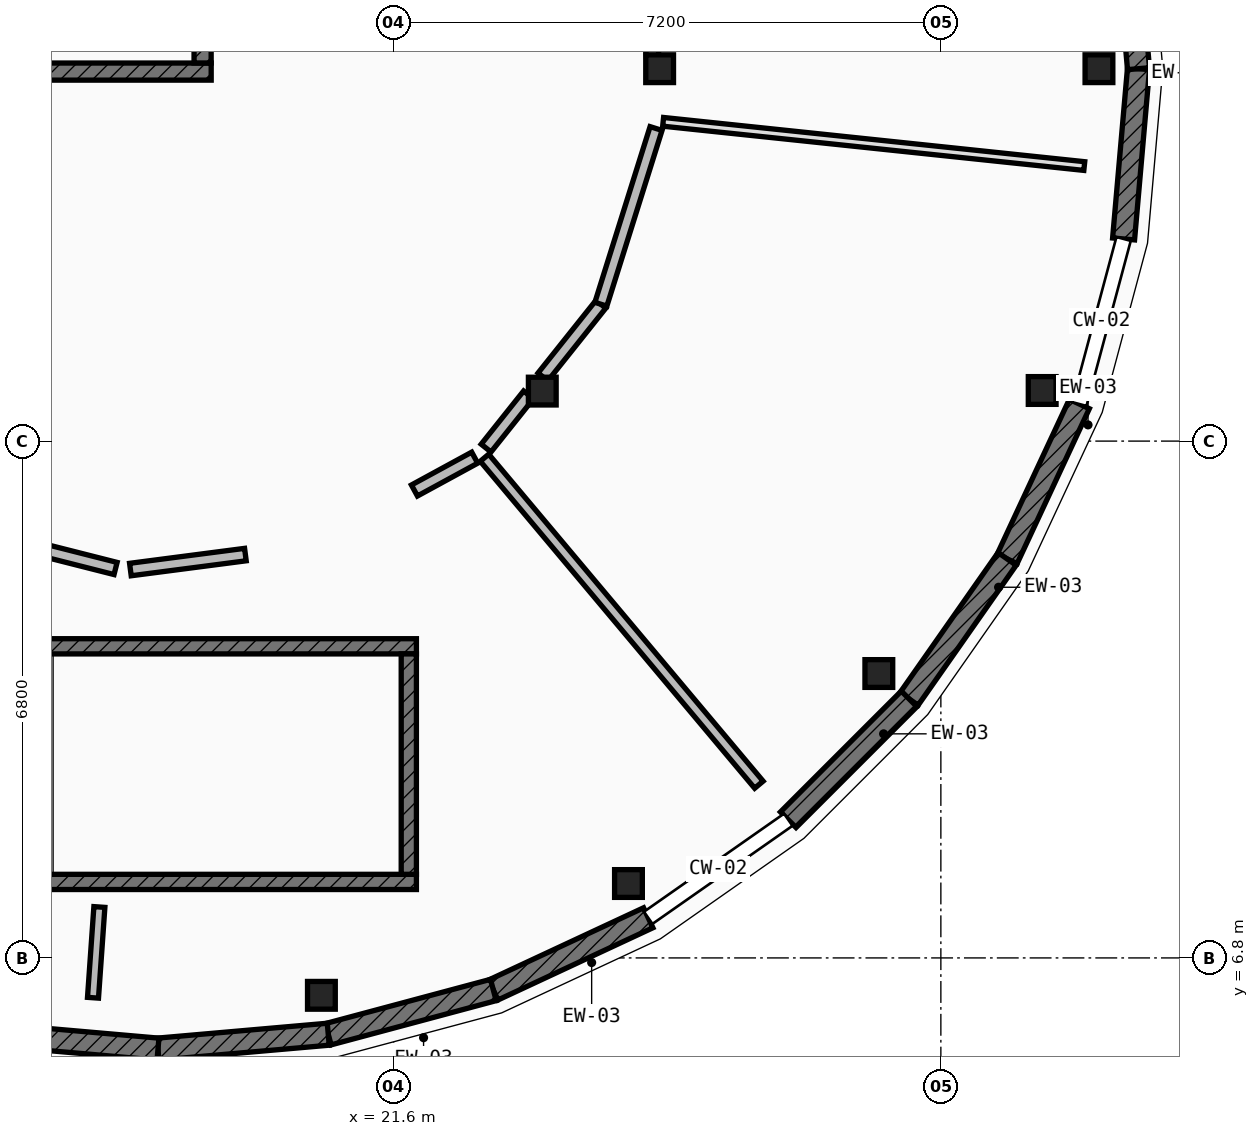
"""IFC4 building model, lengths in metres.
Left out: names, types, materials, properties, quantities, classifications, styles, units other than length and angle.
Written with IfcOpenShell. Run it as: python <this file> out.ifc"""

import sys

from ifc_helpers import new_model, si_unit, direction, frame, frame_2d, origin, origin_2d, place, context, subcontext, project, spatial, rectangle, extrude, element, fill, save


model = new_model("IFC4")
c1 = context("Model", 3, precision=1e-05, world=origin(), true_north=direction((0.0, 1.0)))
c2 = subcontext(c1, "Body", "Model", "MODEL_VIEW")
j1 = project(units=[si_unit("LENGTHUNIT", "METRE"), si_unit("PLANEANGLEUNIT", "RADIAN")], contexts=[c1])
p1 = place(None, origin())
s1 = spatial("IfcSite", under=j1, at=p1, CompositionType="ELEMENT")
p2 = place(p1, origin())
s2 = spatial("IfcBuilding", under=s1, at=p2, CompositionType="ELEMENT")
p3 = place(p2, frame((0.0, 0.0, 8.75)))
s3 = spatial("IfcBuildingStorey", under=s2, at=p3, CompositionType="ELEMENT", Elevation=8.75)
for number, where, z_axis, x_axis in (
    (1, (30.88, 18.5, 0.0), (0.0, 0.0, 1.0), (1.0, 0.0, 0.0)),
    (2, (20.65, 6.308, 0.0), (0.0, 0.0, 1.0), (1.0, 0.0, 0.0)),
    (3, (24.69, 7.779, 0.0), (0.0, 0.0, 1.0), (1.0, 0.0, 0.0)),
    (4, (27.984, 10.542, 0.0), (0.0, 0.0, 1.0), (1.0, 0.0, 0.0)),
    (5, (30.133, 14.266, 0.0), (0.0, 0.0, 1.0), (1.0, 0.0, 0.0)),
    (6, (25.1, 18.5, 0.0), (0.0, 0.0, 1.0), (1.0, 0.0, 0.0)),
    (7, (23.556, 14.258, 0.0), (0.0, 0.0, 1.0), (1.0, 0.0, 0.0)),
):
    element("IfcColumn", number, at=place(p3, frame(where, z_axis=z_axis, x_axis=x_axis)), inside=s3, PredefinedType="COLUMN", context=c2, shape_type="SweptSolid", body=[
        extrude(rectangle(XDim=0.365, YDim=0.365, at=origin_2d()), origin(), (0.0, 0.0, 1.0), 4.2),
    ])
p4 = place(p3, frame((31.4, 18.5, 0.0), z_axis=(0.0, 0.0, 1.0), x_axis=(-0.087079400775, -0.996201374201, 0.0)))
e8 = element("IfcWall", 8, at=p4, inside=s3, PredefinedType="ELEMENTEDWALL", context=c2, shape_type="SweptSolid", body=[
    extrude(rectangle(XDim=2.249, YDim=0.29, at=frame_2d((1.124, 0.0))), origin(), (0.0, 0.0, 1.0), 3.329),
])
p5 = place(p4, frame((0.474, 0.0, 0.7)))
e9 = element("IfcOpeningElement", 9, at=p5, cuts=e8, PredefinedType="OPENING", context=c2, shape_type="SweptSolid", body=[
    extrude(rectangle(XDim=1.3, YDim=2.3, at=frame_2d((0.65, 1.15))), frame((0.0, 0.155, 0.0), z_axis=(0.0, -1.0, 0.0), x_axis=(1.0, 0.0, 0.0)), (0.0, 0.0, 1.0), 0.31),
])
p6 = place(p3, frame((30.622, 14.088, 0.0), z_axis=(0.0, 0.0, 1.0), x_axis=(-0.422504983593, -0.906360600886, 0.0)))
e10 = element("IfcWall", 10, at=p6, inside=s3, PredefinedType="ELEMENTEDWALL", context=c2, shape_type="SweptSolid", body=[
    extrude(rectangle(XDim=2.248, YDim=0.29, at=frame_2d((1.124, 0.0))), origin(), (0.0, 0.0, 1.0), 3.329),
])
p7 = place(p6, frame((0.464, 0.0, 0.85)))
e11 = element("IfcOpeningElement", 11, at=p7, cuts=e10, PredefinedType="OPENING", context=c2, shape_type="SweptSolid", body=[
    extrude(rectangle(XDim=1.32, YDim=1.55, at=frame_2d((0.66, 0.775))), frame((0.0, 0.155, 0.0), z_axis=(0.0, -1.0, 0.0), x_axis=(1.0, 0.0, 0.0)), (0.0, 0.0, 1.0), 0.31),
])
p8 = place(p3, frame((29.672, 12.05, 0.0), z_axis=(0.0, 0.0, 1.0), x_axis=(-0.573644482107, -0.819104393925, 0.0)))
e12 = element("IfcWall", 12, at=p8, inside=s3, PredefinedType="ELEMENTEDWALL", context=c2, shape_type="SweptSolid", body=[
    extrude(rectangle(XDim=2.249, YDim=0.29, at=frame_2d((1.125, 0.0))), origin(), (0.0, 0.0, 1.0), 3.329),
])
p9 = place(p8, frame((0.449, 0.0, 0.85)))
e13 = element("IfcOpeningElement", 13, at=p9, cuts=e12, PredefinedType="OPENING", context=c2, shape_type="SweptSolid", body=[
    extrude(rectangle(XDim=1.35, YDim=1.55, at=frame_2d((0.675, 0.775))), frame((0.0, 0.155, 0.0), z_axis=(0.0, -1.0, 0.0), x_axis=(1.0, 0.0, 0.0)), (0.0, 0.0, 1.0), 0.31),
])
p10 = place(p3, frame((28.382, 10.208, 0.0), z_axis=(0.0, 0.0, 1.0), x_axis=(-0.707106781187, -0.707106781187, 0.0)))
e14 = element("IfcWall", 14, at=p10, inside=s3, PredefinedType="ELEMENTEDWALL", context=c2, shape_type="SweptSolid", body=[
    extrude(rectangle(XDim=2.249, YDim=0.29, at=frame_2d((1.125, 0.0))), origin(), (0.0, 0.0, 1.0), 3.329),
])
p11 = place(p10, frame((0.449, 0.0, 0.85)))
e15 = element("IfcOpeningElement", 15, at=p11, cuts=e14, PredefinedType="OPENING", context=c2, shape_type="SweptSolid", body=[
    extrude(rectangle(XDim=1.35, YDim=1.85, at=frame_2d((0.675, 0.925))), frame((0.0, 0.155, 0.0), z_axis=(0.0, -1.0, 0.0), x_axis=(1.0, 0.0, 0.0)), (0.0, 0.0, 1.0), 0.31),
])
p12 = place(p3, frame((24.95, 7.328, 0.0), z_axis=(0.0, 0.0, 1.0), x_axis=(-0.906360600886, -0.422504983593, 0.0)))
e16 = element("IfcWall", 16, at=p12, inside=s3, PredefinedType="ELEMENTEDWALL", context=c2, shape_type="SweptSolid", body=[
    extrude(rectangle(XDim=2.248, YDim=0.29, at=frame_2d((1.124, 0.0))), origin(), (0.0, 0.0, 1.0), 3.329),
])
p13 = place(p12, frame((0.449, 0.0, 0.85)))
e17 = element("IfcOpeningElement", 17, at=p13, cuts=e16, PredefinedType="OPENING", context=c2, shape_type="SweptSolid", body=[
    extrude(rectangle(XDim=1.35, YDim=2.15, at=frame_2d((0.675, 1.075))), frame((0.0, 0.155, 0.0), z_axis=(0.0, -1.0, 0.0), x_axis=(1.0, 0.0, 0.0)), (0.0, 0.0, 1.0), 0.31),
])
p14 = place(p3, frame((22.912, 6.378, 0.0), z_axis=(0.0, 0.0, 1.0), x_axis=(-0.96592430538, -0.258824721145, 0.0)))
e18 = element("IfcWall", 18, at=p14, inside=s3, PredefinedType="ELEMENTEDWALL", context=c2, shape_type="SweptSolid", body=[
    extrude(rectangle(XDim=2.249, YDim=0.29, at=frame_2d((1.125, 0.0))), origin(), (0.0, 0.0, 1.0), 3.329),
])
p15 = place(p14, frame((0.434, 0.0, 0.85)))
e19 = element("IfcOpeningElement", 19, at=p15, cuts=e18, PredefinedType="OPENING", context=c2, shape_type="SweptSolid", body=[
    extrude(rectangle(XDim=1.38, YDim=1.7, at=frame_2d((0.69, 0.85))), frame((0.0, 0.155, 0.0), z_axis=(0.0, -1.0, 0.0), x_axis=(1.0, 0.0, 0.0)), (0.0, 0.0, 1.0), 0.31),
])
for number, where, z_axis, x_axis in (
    (20, (20.74, 5.796, 0.0), (0.0, 0.0, 1.0), (-0.996, -0.087, 0.0)),
    (21, (18.5, 5.6, 0.0), (0.0, 0.0, 1.0), (-0.996, 0.087, 0.0)),
):
    element("IfcWall", number, at=place(p3, frame(where, z_axis=z_axis, x_axis=x_axis)), inside=s3, PredefinedType="ELEMENTEDWALL", context=c2, shape_type="SweptSolid", body=[
        extrude(rectangle(XDim=2.249, YDim=0.29, at=frame_2d((1.124, 0.0))), origin(), (0.0, 0.0, 1.0), 3.329),
    ])
p16 = place(p3, frame((31.204, 20.74, 0.0), z_axis=(0.0, 0.0, 1.0), x_axis=(0.087079400775, -0.996201374201, 0.0)))
e22 = element("IfcWall", 22, at=p16, inside=s3, PredefinedType="ELEMENTEDWALL", context=c2, shape_type="SweptSolid", body=[
    extrude(rectangle(XDim=2.249, YDim=0.29, at=frame_2d((1.124, 0.0))), origin(), (0.0, 0.0, 1.0), 3.329),
])
p17 = place(p16, frame((0.674, 0.0, 0.85)))
e23 = element("IfcOpeningElement", 23, at=p17, cuts=e22, PredefinedType="OPENING", context=c2, shape_type="SweptSolid", body=[
    extrude(rectangle(XDim=0.9, YDim=1.4, at=frame_2d((0.45, 0.7))), frame((0.0, 0.155, 0.0), z_axis=(0.0, -1.0, 0.0), x_axis=(1.0, 0.0, 0.0)), (0.0, 0.0, 1.0), 0.31),
])
p18 = place(p3, frame((21.9, 10.9, 0.0), z_axis=(0.0, 0.0, 1.0), x_axis=(-1.0, 0.0, 0.0)))
e24 = element("IfcWall", 24, at=p18, inside=s3, PredefinedType="SHEAR", context=c2, shape_type="SweptSolid", body=[
    extrude(rectangle(XDim=6.8, YDim=0.2, at=frame_2d((3.4, 0.0))), origin(), (0.0, 0.0, 1.0), 3.975),
])
p19 = place(p18, frame((0.38, 0.0, 0.0)))
e25 = element("IfcOpeningElement", 25, at=p19, cuts=e24, PredefinedType="OPENING", context=c2, shape_type="SweptSolid", body=[
    extrude(rectangle(XDim=1.05, YDim=2.15, at=frame_2d((0.525, 1.075))), frame((0.0, 0.11, 0.0), z_axis=(0.0, -1.0, 0.0), x_axis=(1.0, 0.0, 0.0)), (0.0, 0.0, 1.0), 0.22),
])
p20 = place(p3, frame((21.9, 7.8, 0.0), z_axis=(0.0, 0.0, 1.0), x_axis=(-1.0, 0.0, 0.0)))
e26 = element("IfcWall", 26, at=p20, inside=s3, PredefinedType="SHEAR", context=c2, shape_type="SweptSolid", body=[
    extrude(rectangle(XDim=6.8, YDim=0.2, at=frame_2d((3.4, 0.0))), origin(), (0.0, 0.0, 1.0), 3.975),
])
p21 = place(p3, frame((21.8, 10.8, 0.0), z_axis=(0.0, 0.0, 1.0), x_axis=(0.0, -1.0, 0.0)))
e27 = element("IfcWall", 27, at=p21, inside=s3, PredefinedType="SHEAR", context=c2, shape_type="SweptSolid", body=[
    extrude(rectangle(XDim=2.9, YDim=0.2, at=frame_2d((1.45, 0.0))), origin(), (0.0, 0.0, 1.0), 3.975),
])
p22 = place(p3, frame((16.1, 18.462, 0.0), z_axis=(0.0, 0.0, 1.0), x_axis=(1.0, 0.0, 0.0)))
e28 = element("IfcWall", 28, at=p22, inside=s3, PredefinedType="SHEAR", context=c2, shape_type="SweptSolid", body=[
    extrude(rectangle(XDim=3.1, YDim=0.225, at=frame_2d((1.55, 0.0))), origin(), (0.0, 0.0, 1.0), 3.975),
])
p23 = place(p22, frame((0.9, 0.0, 0.0)))
e29 = element("IfcOpeningElement", 29, at=p23, cuts=e28, PredefinedType="OPENING", context=c2, shape_type="SweptSolid", body=[
    extrude(rectangle(XDim=1.3, YDim=2.2, at=frame_2d((0.65, 1.1))), frame((0.0, 0.123, 0.0), z_axis=(0.0, -1.0, 0.0), x_axis=(1.0, 0.0, 0.0)), (0.0, 0.0, 1.0), 0.245),
])
p24 = place(p3, frame((19.087, 18.575, 0.0), z_axis=(0.0, 0.0, 1.0), x_axis=(0.0, 1.0, 0.0)))
e30 = element("IfcWall", 30, at=p24, inside=s3, PredefinedType="SHEAR", context=c2, shape_type="SweptSolid", body=[
    extrude(rectangle(XDim=2.15, YDim=0.225, at=frame_2d((1.075, 0.0))), origin(), (0.0, 0.0, 1.0), 3.975),
])
p25 = place(p3, frame((17.729, 7.47, 0.0), z_axis=(0.0, 0.0, 1.0), x_axis=(-0.070159946762, -0.997535754683, 0.0)))
e31 = element("IfcWall", 31, at=p25, inside=s3, PredefinedType="PARTITIONING", context=c2, shape_type="SweptSolid", body=[
    extrude(rectangle(XDim=1.197, YDim=0.145, at=frame_2d((0.599, 0.0))), origin(), (0.0, 0.0, 1.0), 3.304),
])
p26 = place(p3, frame((22.796, 13.381, 0.0), z_axis=(0.0, 0.0, 1.0), x_axis=(0.642818869514, -0.766018211923, 0.0)))
e32 = element("IfcWall", 32, at=p26, inside=s3, PredefinedType="PARTITIONING", context=c2, shape_type="SweptSolid", body=[
    extrude(rectangle(XDim=5.616, YDim=0.145, at=frame_2d((2.808, 0.0))), origin(), (0.0, 0.0, 1.0), 3.304),
])
p27 = place(p3, frame((25.146, 17.801, 0.0), z_axis=(0.0, 0.0, 1.0), x_axis=(0.994528479097, -0.10446580429, 0.0)))
e33 = element("IfcWall", 33, at=p27, inside=s3, PredefinedType="PARTITIONING", context=c2, shape_type="SweptSolid", body=[
    extrude(rectangle(XDim=5.572, YDim=0.115, at=frame_2d((2.786, 0.0))), origin(), (0.0, 0.0, 1.0), 3.304),
])
p28 = place(p3, frame((15.856, 12.453, 0.0), z_axis=(0.0, 0.0, 1.0), x_axis=(0.969336371772, -0.245737661664, 0.0)))
e34 = element("IfcWall", 34, at=p28, inside=s3, PredefinedType="PARTITIONING", context=c2, shape_type="SweptSolid", body=[
    extrude(rectangle(XDim=2.152, YDim=0.165, at=frame_2d((1.076, 0.0))), origin(), (0.0, 0.0, 1.0), 3.304),
])
p29 = place(p3, frame((18.137, 11.91, 0.0), z_axis=(0.0, 0.0, 1.0), x_axis=(0.991627158641, 0.129133954659, 0.0)))
e35 = element("IfcWall", 35, at=p29, inside=s3, PredefinedType="PARTITIONING", context=c2, shape_type="SweptSolid", body=[
    extrude(rectangle(XDim=1.526, YDim=0.165, at=frame_2d((0.763, 0.0))), origin(), (0.0, 0.0, 1.0), 3.304),
])
p30 = place(p3, frame((21.874, 12.95, 0.0), z_axis=(0.0, 0.0, 1.0), x_axis=(0.878081476712, 0.478511149563, 0.0)))
e36 = element("IfcWall", 36, at=p30, inside=s3, PredefinedType="PARTITIONING", context=c2, shape_type="SweptSolid", body=[
    extrude(rectangle(XDim=0.903, YDim=0.165, at=frame_2d((0.452, 0.0))), origin(), (0.0, 0.0, 1.0), 3.304),
])
p31 = place(p3, frame((22.817, 13.508, 0.0), z_axis=(0.0, 0.0, 1.0), x_axis=(0.623430420195, 0.781878834076, 0.0)))
e37 = element("IfcWall", 37, at=p31, inside=s3, PredefinedType="PARTITIONING", context=c2, shape_type="SweptSolid", body=[
    extrude(rectangle(XDim=0.895, YDim=0.165, at=frame_2d((0.448, 0.0))), origin(), (0.0, 0.0, 1.0), 3.304),
])
p32 = place(p3, frame((23.565, 14.445, 0.0), z_axis=(0.0, 0.0, 1.0), x_axis=(0.623354481925, 0.781939377359, 0.0)))
e38 = element("IfcWall", 38, at=p32, inside=s3, PredefinedType="PARTITIONING", context=c2, shape_type="SweptSolid", body=[
    extrude(rectangle(XDim=1.222, YDim=0.165, at=frame_2d((0.611, 0.0))), origin(), (0.0, 0.0, 1.0), 3.304),
])
p33 = place(p3, frame((24.327, 15.401, 0.0), z_axis=(0.0, 0.0, 1.0), x_axis=(0.299617014986, 0.954059560159, 0.0)))
e39 = element("IfcWall", 39, at=p33, inside=s3, PredefinedType="PARTITIONING", context=c2, shape_type="SweptSolid", body=[
    extrude(rectangle(XDim=2.423, YDim=0.165, at=frame_2d((1.212, 0.0))), origin(), (0.0, 0.0, 1.0), 3.304),
])
p34 = place(p33, frame((0.621, 0.0, 0.0)))
e40 = element("IfcOpeningElement", 40, at=p34, cuts=e39, PredefinedType="OPENING", context=c2, shape_type="SweptSolid", body=[
    extrude(rectangle(XDim=1.18, YDim=2.2, at=frame_2d((0.59, 1.1))), frame((0.0, 0.093, 0.0), z_axis=(0.0, -1.0, 0.0), x_axis=(1.0, 0.0, 0.0)), (0.0, 0.0, 1.0), 0.185),
])
p35 = place(p3, frame((25.008, 18.663, 0.0), z_axis=(0.0, 0.0, 1.0), x_axis=(-0.085807505565, 0.996311734343, 0.0)))
e41 = element("IfcWall", 41, at=p35, inside=s3, PredefinedType="PARTITIONING", context=c2, shape_type="SweptSolid", body=[
    extrude(rectangle(XDim=1.551, YDim=0.165, at=frame_2d((0.775, 0.0))), origin(), (0.0, 0.0, 1.0), 3.304),
])
p36 = place(p35, frame((0.3, 0.0, 0.0)))
e42 = element("IfcOpeningElement", 42, at=p36, cuts=e41, PredefinedType="OPENING", context=c2, shape_type="SweptSolid", body=[
    extrude(rectangle(XDim=0.95, YDim=2.16, at=frame_2d((0.475, 1.08))), frame((0.0, 0.093, 0.0), z_axis=(0.0, -1.0, 0.0), x_axis=(1.0, 0.0, 0.0)), (0.0, 0.0, 1.0), 0.185),
])
p37 = place(p5, origin())
e43 = element("IfcWindow", 43, at=p37, inside=s3, PartitioningType="SINGLE_PANEL", PredefinedType="WINDOW", context=c2, shape_type="SweptSolid", body=[
    extrude(rectangle(XDim=1.3, YDim=2.3, at=frame_2d((0.65, 1.15))), frame((0.0, 0.03, 0.0), z_axis=(0.0, -1.0, 0.0), x_axis=(1.0, 0.0, 0.0)), (0.0, 0.0, 1.0), 0.06),
])
fill(e9, e43)
p38 = place(p7, origin())
e44 = element("IfcWindow", 44, at=p38, inside=s3, PartitioningType="SINGLE_PANEL", PredefinedType="WINDOW", context=c2, shape_type="SweptSolid", body=[
    extrude(rectangle(XDim=1.32, YDim=1.55, at=frame_2d((0.66, 0.775))), frame((0.0, 0.03, 0.0), z_axis=(0.0, -1.0, 0.0), x_axis=(1.0, 0.0, 0.0)), (0.0, 0.0, 1.0), 0.06),
])
fill(e11, e44)
p39 = place(p9, origin())
e45 = element("IfcWindow", 45, at=p39, inside=s3, PartitioningType="SINGLE_PANEL", PredefinedType="WINDOW", context=c2, shape_type="SweptSolid", body=[
    extrude(rectangle(XDim=1.35, YDim=1.55, at=frame_2d((0.675, 0.775))), frame((0.0, 0.03, 0.0), z_axis=(0.0, -1.0, 0.0), x_axis=(1.0, 0.0, 0.0)), (0.0, 0.0, 1.0), 0.06),
])
fill(e13, e45)
p40 = place(p11, origin())
e46 = element("IfcWindow", 46, at=p40, inside=s3, PartitioningType="SINGLE_PANEL", PredefinedType="WINDOW", context=c2, shape_type="SweptSolid", body=[
    extrude(rectangle(XDim=1.35, YDim=1.85, at=frame_2d((0.675, 0.925))), frame((0.0, 0.03, 0.0), z_axis=(0.0, -1.0, 0.0), x_axis=(1.0, 0.0, 0.0)), (0.0, 0.0, 1.0), 0.06),
])
fill(e15, e46)
p41 = place(p13, origin())
e47 = element("IfcWindow", 47, at=p41, inside=s3, PartitioningType="SINGLE_PANEL", PredefinedType="WINDOW", context=c2, shape_type="SweptSolid", body=[
    extrude(rectangle(XDim=1.35, YDim=2.15, at=frame_2d((0.675, 1.075))), frame((0.0, 0.03, 0.0), z_axis=(0.0, -1.0, 0.0), x_axis=(1.0, 0.0, 0.0)), (0.0, 0.0, 1.0), 0.06),
])
fill(e17, e47)
p42 = place(p15, origin())
e48 = element("IfcWindow", 48, at=p42, inside=s3, PartitioningType="SINGLE_PANEL", PredefinedType="WINDOW", context=c2, shape_type="SweptSolid", body=[
    extrude(rectangle(XDim=1.38, YDim=1.7, at=frame_2d((0.69, 0.85))), frame((0.0, 0.03, 0.0), z_axis=(0.0, -1.0, 0.0), x_axis=(1.0, 0.0, 0.0)), (0.0, 0.0, 1.0), 0.06),
])
fill(e19, e48)
p43 = place(p19, origin())
e49 = element("IfcDoor", 49, at=p43, inside=s3, OperationType="SINGLE_SWING_RIGHT", PredefinedType="DOOR", context=c2, shape_type="SweptSolid", body=[
    extrude(rectangle(XDim=1.05, YDim=2.15, at=frame_2d((0.525, 1.075))), frame((0.0, 0.025, 0.0), z_axis=(0.0, -1.0, 0.0), x_axis=(1.0, 0.0, 0.0)), (0.0, 0.0, 1.0), 0.05),
])
fill(e25, e49)
p44 = place(p23, origin())
e50 = element("IfcDoor", 50, at=p44, inside=s3, OperationType="DOUBLE_DOOR_SLIDING", PredefinedType="DOOR", context=c2, shape_type="SweptSolid", body=[
    extrude(rectangle(XDim=1.3, YDim=2.2, at=frame_2d((0.65, 1.1))), frame((0.0, 0.025, 0.0), z_axis=(0.0, -1.0, 0.0), x_axis=(1.0, 0.0, 0.0)), (0.0, 0.0, 1.0), 0.05),
])
fill(e29, e50)
p45 = place(p34, origin())
e51 = element("IfcDoor", 51, at=p45, inside=s3, OperationType="SINGLE_SWING_LEFT", PredefinedType="DOOR", context=c2, shape_type="SweptSolid", body=[
    extrude(rectangle(XDim=1.18, YDim=2.2, at=frame_2d((0.59, 1.1))), frame((0.0, 0.025, 0.0), z_axis=(0.0, -1.0, 0.0), x_axis=(1.0, 0.0, 0.0)), (0.0, 0.0, 1.0), 0.05),
])
fill(e40, e51)
save(model, sys.argv[1])
